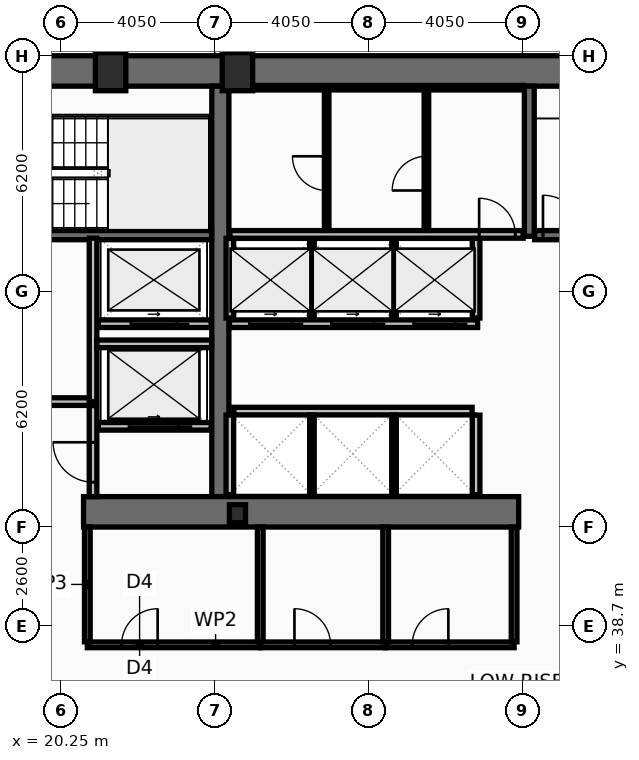
"""IFC4 building model, lengths in metres.
Left out: names, types, materials, properties, quantities, classifications, styles, units other than length and angle.
Written with IfcOpenShell. Run it as: python <this file> out.ifc"""

import sys

from ifc_helpers import new_model, si_unit, direction, frame, frame_2d, origin, origin_2d, place, context, subcontext, project, spatial, rectangle, hollow_rectangle, i_section, extrude, element, fill, save


model = new_model("IFC4")
c1 = context("Model", 3, precision=1e-05, world=origin(), true_north=direction((0.0, 1.0)))
c2 = subcontext(c1, "Body", "Model", "MODEL_VIEW")
j1 = project(units=[si_unit("LENGTHUNIT", "METRE"), si_unit("PLANEANGLEUNIT", "RADIAN")], contexts=[c1])
p1 = place(None, origin())
s1 = spatial("IfcSite", under=j1, at=p1, CompositionType="ELEMENT")
p2 = place(p1, origin())
s2 = spatial("IfcBuilding", under=s1, at=p2, CompositionType="ELEMENT")
p3 = place(p2, frame((0.0, 0.0, 57.8)))
s3 = spatial("IfcBuildingStorey", under=s2, at=p3, CompositionType="ELEMENT", Elevation=57.8)
p4 = place(p3, frame((16.2, 53.3, 0.0), z_axis=(0.0, 0.0, 1.0), x_axis=(1.0, 0.0, 0.0)))
e1 = element("IfcWall", 1, at=p4, inside=s3, PredefinedType="SHEAR", context=c2, shape_type="SweptSolid", body=[
    extrude(rectangle(XDim=40.5, YDim=0.8, at=frame_2d((20.25, 0.0))), origin(), (0.0, 0.0, 1.0), 3.82),
])
p5 = place(p3, frame((24.45, 42.1, 0.0), z_axis=(0.0, 0.0, 1.0), x_axis=(0.0, 1.0, 0.0)))
e2 = element("IfcWall", 2, at=p5, inside=s3, PredefinedType="SHEAR", context=c2, shape_type="SweptSolid", body=[
    extrude(rectangle(XDim=10.8, YDim=0.45, at=frame_2d((5.4, 0.0))), origin(), (0.0, 0.0, 1.0), 3.82),
])
p6 = place(p3, frame((32.3, 41.7, 0.0), z_axis=(0.0, 0.0, 1.0), x_axis=(-1.0, 0.0, 0.0)))
e3 = element("IfcWall", 3, at=p6, inside=s3, PredefinedType="SHEAR", context=c2, shape_type="SweptSolid", body=[
    extrude(rectangle(XDim=11.45, YDim=0.8, at=frame_2d((5.725, 0.0))), origin(), (0.0, 0.0, 1.0), 3.82),
])
p7 = place(p3, frame((32.58, 48.95, 0.0), z_axis=(0.0, 0.0, 1.0), x_axis=(0.0, 1.0, 0.0)))
e4 = element("IfcWall", 4, at=p7, inside=s3, PredefinedType="SHEAR", context=c2, shape_type="SweptSolid", body=[
    extrude(rectangle(XDim=3.95, YDim=0.26, at=frame_2d((1.975, 0.0))), origin(), (0.0, 0.0, 1.0), 3.82),
])
p8 = place(p3, frame((17.0, 48.98, 0.0), z_axis=(0.0, 0.0, 1.0), x_axis=(1.0, 0.0, 0.0)))
e5 = element("IfcWall", 5, at=p8, inside=s3, PredefinedType="SHEAR", context=c2, shape_type="SweptSolid", body=[
    extrude(rectangle(XDim=7.22, YDim=0.24, at=frame_2d((3.61, 0.0))), origin(), (0.0, 0.0, 1.0), 3.82),
])
p9 = place(p8, frame((0.22, 0.0, 0.0)))
e6 = element("IfcOpeningElement", 6, at=p9, cuts=e5, PredefinedType="OPENING", context=c2, shape_type="SweptSolid", body=[
    extrude(rectangle(XDim=1.05, YDim=2.15, at=frame_2d((0.525, 1.075))), frame((0.0, 0.13, 0.0), z_axis=(0.0, -1.0, 0.0), x_axis=(1.0, 0.0, 0.0)), (0.0, 0.0, 1.0), 0.26),
])
p10 = place(p3, frame((32.72, 48.98, 0.0), z_axis=(0.0, 0.0, 1.0), x_axis=(1.0, 0.0, 0.0)))
e7 = element("IfcWall", 7, at=p10, inside=s3, PredefinedType="SHEAR", context=c2, shape_type="SweptSolid", body=[
    extrude(rectangle(XDim=7.56, YDim=0.24, at=frame_2d((3.78, 0.0))), origin(), (0.0, 0.0, 1.0), 3.82),
])
p11 = place(p10, frame((0.22, 0.0, 0.0)))
e8 = element("IfcOpeningElement", 8, at=p11, cuts=e7, PredefinedType="OPENING", context=c2, shape_type="SweptSolid", body=[
    extrude(rectangle(XDim=1.05, YDim=2.15, at=frame_2d((0.525, 1.075))), frame((0.0, 0.13, 0.0), z_axis=(0.0, -1.0, 0.0), x_axis=(1.0, 0.0, 0.0)), (0.0, 0.0, 1.0), 0.26),
])
for number, where, z_axis, x_axis in (
    (9, (21.562, 53.28, 0.0), (0.0, 0.0, 1.0), (1.0, 0.0, 0.0)),
    (10, (24.9, 53.28, 0.0), (0.0, 0.0, 1.0), (1.0, 0.0, 0.0)),
):
    element("IfcColumn", number, at=place(p3, frame(where, z_axis=z_axis, x_axis=x_axis)), inside=s3, PredefinedType="COLUMN", context=c2, shape_type="SweptSolid", body=[
        extrude(hollow_rectangle(XDim=0.8, YDim=1.0, WallThickness=0.055, at=origin_2d()), origin(), (0.0, 0.0, 1.0), 4.0),
    ])
p12 = place(p3, frame((24.9, 41.65, 0.0), z_axis=(0.0, 0.0, 1.0), x_axis=(1.0, 0.0, 0.0)))
e11 = element("IfcColumn", 11, at=p12, inside=s3, PredefinedType="COLUMN", context=c2, shape_type="SweptSolid", body=[
    extrude(i_section(OverallWidth=0.424, OverallDepth=0.474, WebThickness=0.048, FlangeThickness=0.077, at=origin_2d()), origin(), (0.0, 0.0, 1.0), 4.0),
])
p13 = place(p3, frame((24.21, 43.95, 0.0), z_axis=(0.0, 0.0, 1.0), x_axis=(-1.0, 0.0, 0.0)))
e12 = element("IfcWall", 12, at=p13, inside=s3, PredefinedType="PARTITIONING", context=c2, shape_type="SweptSolid", body=[
    extrude(rectangle(XDim=2.97, YDim=0.2, at=frame_2d((1.485, 0.0))), origin(), (0.0, 0.0, 1.0), 3.82),
])
p14 = place(p13, frame((0.86, 0.0, 0.0)))
e13 = element("IfcOpeningElement", 13, at=p14, cuts=e12, PredefinedType="OPENING", context=c2, shape_type="SweptSolid", body=[
    extrude(rectangle(XDim=1.3, YDim=2.18, at=frame_2d((0.65, 1.09))), frame((0.0, 0.11, 0.0), z_axis=(0.0, -1.0, 0.0), x_axis=(1.0, 0.0, 0.0)), (0.0, 0.0, 1.0), 0.22),
])
p15 = place(p3, frame((24.21, 46.65, 0.0), z_axis=(0.0, 0.0, 1.0), x_axis=(-1.0, 0.0, 0.0)))
e14 = element("IfcWall", 14, at=p15, inside=s3, PredefinedType="PARTITIONING", context=c2, shape_type="SweptSolid", body=[
    extrude(rectangle(XDim=2.97, YDim=0.2, at=frame_2d((1.485, 0.0))), origin(), (0.0, 0.0, 1.0), 3.82),
])
p16 = place(p15, frame((0.91, 0.0, 0.0)))
e15 = element("IfcOpeningElement", 15, at=p16, cuts=e14, PredefinedType="OPENING", context=c2, shape_type="SweptSolid", body=[
    extrude(rectangle(XDim=1.2, YDim=2.18, at=frame_2d((0.6, 1.09))), frame((0.0, 0.11, 0.0), z_axis=(0.0, -1.0, 0.0), x_axis=(1.0, 0.0, 0.0)), (0.0, 0.0, 1.0), 0.22),
])
p17 = place(p3, frame((31.22, 46.65, 0.0), z_axis=(0.0, 0.0, 1.0), x_axis=(-1.0, 0.0, 0.0)))
e16 = element("IfcWall", 16, at=p17, inside=s3, PredefinedType="PARTITIONING", context=c2, shape_type="SweptSolid", body=[
    extrude(rectangle(XDim=6.53, YDim=0.2, at=frame_2d((3.265, 0.0))), origin(), (0.0, 0.0, 1.0), 3.82),
])
p18 = place(p17, frame((4.9, 0.0, 0.0)))
e17 = element("IfcOpeningElement", 17, at=p18, cuts=e16, PredefinedType="OPENING", context=c2, shape_type="SweptSolid", body=[
    extrude(rectangle(XDim=1.1, YDim=2.18, at=frame_2d((0.55, 1.09))), frame((0.0, 0.11, 0.0), z_axis=(0.0, -1.0, 0.0), x_axis=(1.0, 0.0, 0.0)), (0.0, 0.0, 1.0), 0.22),
])
p19 = place(p17, frame((2.74, 0.0, 0.0)))
e18 = element("IfcOpeningElement", 18, at=p19, cuts=e16, PredefinedType="OPENING", context=c2, shape_type="SweptSolid", body=[
    extrude(rectangle(XDim=1.1, YDim=2.18, at=frame_2d((0.55, 1.09))), frame((0.0, 0.11, 0.0), z_axis=(0.0, -1.0, 0.0), x_axis=(1.0, 0.0, 0.0)), (0.0, 0.0, 1.0), 0.22),
])
p20 = place(p17, frame((0.58, 0.0, 0.0)))
e19 = element("IfcOpeningElement", 19, at=p20, cuts=e16, PredefinedType="OPENING", context=c2, shape_type="SweptSolid", body=[
    extrude(rectangle(XDim=1.1, YDim=2.18, at=frame_2d((0.55, 1.09))), frame((0.0, 0.11, 0.0), z_axis=(0.0, -1.0, 0.0), x_axis=(1.0, 0.0, 0.0)), (0.0, 0.0, 1.0), 0.22),
])
p21 = place(p3, frame((21.1, 44.6, 0.0), z_axis=(0.0, 0.0, 1.0), x_axis=(0.0, 1.0, 0.0)))
e20 = element("IfcWall", 20, at=p21, inside=s3, PredefinedType="PARTITIONING", context=c2, shape_type="SweptSolid", body=[
    extrude(rectangle(XDim=4.3, YDim=0.2, at=frame_2d((2.15, 0.0))), origin(), (0.0, 0.0, 1.0), 3.82),
])
p22 = place(p3, frame((17.0, 44.6, 0.0), z_axis=(0.0, 0.0, 1.0), x_axis=(1.0, 0.0, 0.0)))
e21 = element("IfcWall", 21, at=p22, inside=s3, PredefinedType="PARTITIONING", context=c2, shape_type="SweptSolid", body=[
    extrude(rectangle(XDim=4.0, YDim=0.2, at=frame_2d((2.0, 0.0))), origin(), (0.0, 0.0, 1.0), 3.82),
])
p23 = place(p22, frame((1.25, 0.0, 0.0)))
e22 = element("IfcOpeningElement", 22, at=p23, cuts=e21, PredefinedType="OPENING", context=c2, shape_type="SweptSolid", body=[
    extrude(rectangle(XDim=1.05, YDim=2.15, at=frame_2d((0.525, 1.075))), frame((0.0, 0.11, 0.0), z_axis=(0.0, -1.0, 0.0), x_axis=(1.0, 0.0, 0.0)), (0.0, 0.0, 1.0), 0.22),
])
p24 = place(p3, frame((21.2, 46.12, 0.0), z_axis=(0.0, 0.0, 1.0), x_axis=(1.0, 0.0, 0.0)))
e23 = element("IfcWall", 23, at=p24, inside=s3, PredefinedType="PARTITIONING", context=c2, shape_type="SweptSolid", body=[
    extrude(rectangle(XDim=3.02, YDim=0.2, at=frame_2d((1.51, 0.0))), origin(), (0.0, 0.0, 1.0), 3.82),
])
p25 = place(p3, frame((21.1, 42.1, 0.0), z_axis=(0.0, 0.0, 1.0), x_axis=(0.0, 1.0, 0.0)))
e24 = element("IfcWall", 24, at=p25, inside=s3, PredefinedType="PARTITIONING", context=c2, shape_type="SweptSolid", body=[
    extrude(rectangle(XDim=2.395, YDim=0.2, at=frame_2d((1.198, 0.0))), origin(), (0.0, 0.0, 1.0), 3.82),
])
p26 = place(p25, frame((0.38, 0.0, 0.0)))
e25 = element("IfcOpeningElement", 25, at=p26, cuts=e24, PredefinedType="OPENING", context=c2, shape_type="SweptSolid", body=[
    extrude(rectangle(XDim=1.05, YDim=2.15, at=frame_2d((0.525, 1.075))), frame((0.0, 0.11, 0.0), z_axis=(0.0, -1.0, 0.0), x_axis=(1.0, 0.0, 0.0)), (0.0, 0.0, 1.0), 0.22),
])
for number, where, z_axis, x_axis in (
    (26, (24.7, 46.8, 0.0), (0.0, 0.0, 1.0), (0.0, 1.0, 0.0)),
    (27, (31.18, 46.8, 0.0), (0.0, 0.0, 1.0), (0.0, 1.0, 0.0)),
):
    element("IfcWall", number, at=place(p3, frame(where, z_axis=z_axis, x_axis=x_axis)), inside=s3, PredefinedType="PARTITIONING", context=c2, shape_type="SweptSolid", body=[
        extrude(rectangle(XDim=2.095, YDim=0.2, at=frame_2d((1.047, 0.0))), origin(), (0.0, 0.0, 1.0), 3.82),
    ])
for number, where, z_axis, x_axis in (
    (28, (26.86, 46.8, 0.0), (0.0, 0.0, 1.0), (0.0, 1.0, 0.0)),
    (29, (29.02, 46.8, 0.0), (0.0, 0.0, 1.0), (0.0, 1.0, 0.0)),
):
    element("IfcWall", number, at=place(p3, frame(where, z_axis=z_axis, x_axis=x_axis)), inside=s3, PredefinedType="PARTITIONING", context=c2, shape_type="SweptSolid", body=[
        extrude(rectangle(XDim=2.095, YDim=0.12, at=frame_2d((1.047, 0.0))), origin(), (0.0, 0.0, 1.0), 3.82),
    ])
p27 = place(p3, frame((24.805, 44.35, 0.0), z_axis=(0.0, 0.0, 1.0), x_axis=(1.0, 0.0, 0.0)))
e30 = element("IfcWall", 30, at=p27, inside=s3, PredefinedType="PARTITIONING", context=c2, shape_type="SweptSolid", body=[
    extrude(rectangle(XDim=6.27, YDim=0.2, at=frame_2d((3.135, 0.0))), origin(), (0.0, 0.0, 1.0), 3.82),
])
for number, where, z_axis, x_axis in (
    (31, (24.7, 42.15, 0.0), (0.0, 0.0, 1.0), (0.0, 1.0, 0.0)),
    (32, (31.18, 42.15, 0.0), (0.0, 0.0, 1.0), (0.0, 1.0, 0.0)),
):
    element("IfcWall", number, at=place(p3, frame(where, z_axis=z_axis, x_axis=x_axis)), inside=s3, PredefinedType="PARTITIONING", context=c2, shape_type="SweptSolid", body=[
        extrude(rectangle(XDim=2.095, YDim=0.2, at=frame_2d((1.048, 0.0))), origin(), (0.0, 0.0, 1.0), 3.82),
    ])
for number, where, z_axis, x_axis in (
    (33, (26.86, 42.15, 0.0), (0.0, 0.0, 1.0), (0.0, 1.0, 0.0)),
    (34, (29.02, 42.15, 0.0), (0.0, 0.0, 1.0), (0.0, 1.0, 0.0)),
):
    element("IfcWall", number, at=place(p3, frame(where, z_axis=z_axis, x_axis=x_axis)), inside=s3, PredefinedType="PARTITIONING", context=c2, shape_type="SweptSolid", body=[
        extrude(rectangle(XDim=2.095, YDim=0.12, at=frame_2d((1.048, 0.0))), origin(), (0.0, 0.0, 1.0), 3.82),
    ])
p28 = place(p3, frame((24.7, 52.86, 0.0), z_axis=(0.0, 0.0, 1.0), x_axis=(1.0, 0.0, 0.0)))
e35 = element("IfcWall", 35, at=p28, inside=s3, PredefinedType="PARTITIONING", context=c2, shape_type="SweptSolid", body=[
    extrude(rectangle(XDim=7.72, YDim=0.12, at=frame_2d((3.86, 0.0))), origin(), (0.0, 0.0, 1.0), 3.82),
])
p29 = place(p3, frame((24.7, 49.0, 0.0), z_axis=(0.0, 0.0, 1.0), x_axis=(1.0, 0.0, 0.0)))
e36 = element("IfcWall", 36, at=p29, inside=s3, PredefinedType="PARTITIONING", context=c2, shape_type="SweptSolid", body=[
    extrude(rectangle(XDim=7.72, YDim=0.2, at=frame_2d((3.86, 0.0))), origin(), (0.0, 0.0, 1.0), 3.82),
])
p30 = place(p29, frame((6.56, 0.0, 0.0)))
e37 = element("IfcOpeningElement", 37, at=p30, cuts=e36, PredefinedType="OPENING", context=c2, shape_type="SweptSolid", body=[
    extrude(rectangle(XDim=0.95, YDim=2.1, at=frame_2d((0.475, 1.05))), frame((0.0, 0.11, 0.0), z_axis=(0.0, -1.0, 0.0), x_axis=(1.0, 0.0, 0.0)), (0.0, 0.0, 1.0), 0.22),
])
p31 = place(p3, frame((27.248, 49.105, 0.0), z_axis=(0.0, 0.0, 1.0), x_axis=(0.0, 1.0, 0.0)))
e38 = element("IfcWall", 38, at=p31, inside=s3, PredefinedType="PARTITIONING", context=c2, shape_type="SweptSolid", body=[
    extrude(rectangle(XDim=3.69, YDim=0.12, at=frame_2d((1.845, 0.0))), origin(), (0.0, 0.0, 1.0), 3.82),
])
p32 = place(p31, frame((1.05, 0.0, 0.0)))
e39 = element("IfcOpeningElement", 39, at=p32, cuts=e38, PredefinedType="OPENING", context=c2, shape_type="SweptSolid", body=[
    extrude(rectangle(XDim=0.9, YDim=2.05, at=frame_2d((0.45, 1.025))), frame((0.0, 0.07, 0.0), z_axis=(0.0, -1.0, 0.0), x_axis=(1.0, 0.0, 0.0)), (0.0, 0.0, 1.0), 0.14),
])
p33 = place(p3, frame((29.872, 49.105, 0.0), z_axis=(0.0, 0.0, 1.0), x_axis=(0.0, 1.0, 0.0)))
e40 = element("IfcWall", 40, at=p33, inside=s3, PredefinedType="PARTITIONING", context=c2, shape_type="SweptSolid", body=[
    extrude(rectangle(XDim=3.69, YDim=0.12, at=frame_2d((1.845, 0.0))), origin(), (0.0, 0.0, 1.0), 3.82),
])
p34 = place(p33, frame((1.05, 0.0, 0.0)))
e41 = element("IfcOpeningElement", 41, at=p34, cuts=e40, PredefinedType="OPENING", context=c2, shape_type="SweptSolid", body=[
    extrude(rectangle(XDim=0.9, YDim=2.05, at=frame_2d((0.45, 1.025))), frame((0.0, 0.07, 0.0), z_axis=(0.0, -1.0, 0.0), x_axis=(1.0, 0.0, 0.0)), (0.0, 0.0, 1.0), 0.14),
])
p35 = place(p3, frame((20.95, 38.2, 0.0), z_axis=(0.0, 0.0, 1.0), x_axis=(1.0, 0.0, 0.0)))
e42 = element("IfcWall", 42, at=p35, inside=s3, PredefinedType="PARTITIONING", context=c2, shape_type="SweptSolid", body=[
    extrude(rectangle(XDim=4.55, YDim=0.15, at=frame_2d((2.275, 0.0))), origin(), (0.0, 0.0, 1.0), 3.01),
])
p36 = place(p35, frame((0.9, 0.0, 0.0)))
e43 = element("IfcOpeningElement", 43, at=p36, cuts=e42, PredefinedType="OPENING", context=c2, shape_type="SweptSolid", body=[
    extrude(rectangle(XDim=0.95, YDim=2.05, at=frame_2d((0.475, 1.025))), frame((0.0, 0.085, 0.0), z_axis=(0.0, -1.0, 0.0), x_axis=(1.0, 0.0, 0.0)), (0.0, 0.0, 1.0), 0.17),
])
p37 = place(p3, frame((25.5, 38.2, 0.0), z_axis=(0.0, 0.0, 1.0), x_axis=(1.0, 0.0, 0.0)))
e44 = element("IfcWall", 44, at=p37, inside=s3, PredefinedType="PARTITIONING", context=c2, shape_type="SweptSolid", body=[
    extrude(rectangle(XDim=3.3, YDim=0.15, at=frame_2d((1.65, 0.0))), origin(), (0.0, 0.0, 1.0), 3.82),
])
p38 = place(p37, frame((0.9, 0.0, 0.0)))
e45 = element("IfcOpeningElement", 45, at=p38, cuts=e44, PredefinedType="OPENING", context=c2, shape_type="SweptSolid", body=[
    extrude(rectangle(XDim=0.95, YDim=2.05, at=frame_2d((0.475, 1.025))), frame((0.0, 0.085, 0.0), z_axis=(0.0, -1.0, 0.0), x_axis=(1.0, 0.0, 0.0)), (0.0, 0.0, 1.0), 0.17),
])
p39 = place(p3, frame((28.8, 38.2, 0.0), z_axis=(0.0, 0.0, 1.0), x_axis=(1.0, 0.0, 0.0)))
e46 = element("IfcWall", 46, at=p39, inside=s3, PredefinedType="PARTITIONING", context=c2, shape_type="SweptSolid", body=[
    extrude(rectangle(XDim=3.38, YDim=0.15, at=frame_2d((1.69, 0.0))), origin(), (0.0, 0.0, 1.0), 3.01),
])
p40 = place(p39, frame((0.7, 0.0, 0.0)))
e47 = element("IfcOpeningElement", 47, at=p40, cuts=e46, PredefinedType="OPENING", context=c2, shape_type="SweptSolid", body=[
    extrude(rectangle(XDim=0.95, YDim=2.05, at=frame_2d((0.475, 1.025))), frame((0.0, 0.085, 0.0), z_axis=(0.0, -1.0, 0.0), x_axis=(1.0, 0.0, 0.0)), (0.0, 0.0, 1.0), 0.17),
])
for number, where, z_axis, x_axis in (
    (48, (20.95, 38.28, 0.0), (0.0, 0.0, 1.0), (0.0, 1.0, 0.0)),
    (49, (25.5, 38.28, 0.0), (0.0, 0.0, 1.0), (0.0, 1.0, 0.0)),
    (50, (28.8, 38.28, 0.0), (0.0, 0.0, 1.0), (0.0, 1.0, 0.0)),
    (51, (32.18, 38.28, 0.0), (0.0, 0.0, 1.0), (0.0, 1.0, 0.0)),
):
    element("IfcWall", number, at=place(p3, frame(where, z_axis=z_axis, x_axis=x_axis)), inside=s3, PredefinedType="PARTITIONING", context=c2, shape_type="SweptSolid", body=[
        extrude(rectangle(XDim=3.02, YDim=0.15, at=frame_2d((1.51, 0.0))), origin(), (0.0, 0.0, 1.0), 3.82),
    ])
p41 = place(p11, origin())
e52 = element("IfcDoor", 52, at=p41, inside=s3, OperationType="SINGLE_SWING_LEFT", PredefinedType="DOOR", context=c2, shape_type="SweptSolid", body=[
    extrude(rectangle(XDim=1.05, YDim=2.15, at=frame_2d((0.525, 1.075))), frame((0.0, 0.025, 0.0), z_axis=(0.0, -1.0, 0.0), x_axis=(1.0, 0.0, 0.0)), (0.0, 0.0, 1.0), 0.05),
])
fill(e8, e52)
p42 = place(p14, origin())
e53 = element("IfcDoor", 53, at=p42, inside=s3, OperationType="SLIDING_TO_LEFT", PredefinedType="DOOR", context=c2, shape_type="SweptSolid", body=[
    extrude(rectangle(XDim=1.3, YDim=2.18, at=frame_2d((0.65, 1.09))), frame((0.0, 0.025, 0.0), z_axis=(0.0, -1.0, 0.0), x_axis=(1.0, 0.0, 0.0)), (0.0, 0.0, 1.0), 0.05),
])
fill(e13, e53)
p43 = place(p16, origin())
e54 = element("IfcDoor", 54, at=p43, inside=s3, OperationType="SLIDING_TO_LEFT", PredefinedType="DOOR", context=c2, shape_type="SweptSolid", body=[
    extrude(rectangle(XDim=1.2, YDim=2.18, at=frame_2d((0.6, 1.09))), frame((0.0, 0.025, 0.0), z_axis=(0.0, -1.0, 0.0), x_axis=(1.0, 0.0, 0.0)), (0.0, 0.0, 1.0), 0.05),
])
fill(e15, e54)
p44 = place(p18, origin())
e55 = element("IfcDoor", 55, at=p44, inside=s3, OperationType="SLIDING_TO_LEFT", PredefinedType="DOOR", context=c2, shape_type="SweptSolid", body=[
    extrude(rectangle(XDim=1.1, YDim=2.18, at=frame_2d((0.55, 1.09))), frame((0.0, 0.025, 0.0), z_axis=(0.0, -1.0, 0.0), x_axis=(1.0, 0.0, 0.0)), (0.0, 0.0, 1.0), 0.05),
])
fill(e17, e55)
p45 = place(p19, origin())
e56 = element("IfcDoor", 56, at=p45, inside=s3, OperationType="SLIDING_TO_LEFT", PredefinedType="DOOR", context=c2, shape_type="SweptSolid", body=[
    extrude(rectangle(XDim=1.1, YDim=2.18, at=frame_2d((0.55, 1.09))), frame((0.0, 0.025, 0.0), z_axis=(0.0, -1.0, 0.0), x_axis=(1.0, 0.0, 0.0)), (0.0, 0.0, 1.0), 0.05),
])
fill(e18, e56)
p46 = place(p20, origin())
e57 = element("IfcDoor", 57, at=p46, inside=s3, OperationType="SLIDING_TO_LEFT", PredefinedType="DOOR", context=c2, shape_type="SweptSolid", body=[
    extrude(rectangle(XDim=1.1, YDim=2.18, at=frame_2d((0.55, 1.09))), frame((0.0, 0.025, 0.0), z_axis=(0.0, -1.0, 0.0), x_axis=(1.0, 0.0, 0.0)), (0.0, 0.0, 1.0), 0.05),
])
fill(e19, e57)
p47 = place(p26, origin())
e58 = element("IfcDoor", 58, at=p47, inside=s3, OperationType="SINGLE_SWING_RIGHT", PredefinedType="DOOR", context=c2, shape_type="SweptSolid", body=[
    extrude(rectangle(XDim=1.05, YDim=2.15, at=frame_2d((0.525, 1.075))), frame((0.0, 0.025, 0.0), z_axis=(0.0, -1.0, 0.0), x_axis=(1.0, 0.0, 0.0)), (0.0, 0.0, 1.0), 0.05),
])
fill(e25, e58)
p48 = place(p30, origin())
e59 = element("IfcDoor", 59, at=p48, inside=s3, OperationType="SINGLE_SWING_LEFT", PredefinedType="DOOR", context=c2, shape_type="SweptSolid", body=[
    extrude(rectangle(XDim=0.95, YDim=2.1, at=frame_2d((0.475, 1.05))), frame((0.0, 0.025, 0.0), z_axis=(0.0, -1.0, 0.0), x_axis=(1.0, 0.0, 0.0)), (0.0, 0.0, 1.0), 0.05),
])
fill(e37, e59)
p49 = place(p32, origin())
e60 = element("IfcDoor", 60, at=p49, inside=s3, OperationType="SINGLE_SWING_RIGHT", PredefinedType="DOOR", context=c2, shape_type="SweptSolid", body=[
    extrude(rectangle(XDim=0.9, YDim=2.05, at=frame_2d((0.45, 1.025))), frame((0.0, 0.025, 0.0), z_axis=(0.0, -1.0, 0.0), x_axis=(1.0, 0.0, 0.0)), (0.0, 0.0, 1.0), 0.05),
])
fill(e39, e60)
p50 = place(p34, origin())
e61 = element("IfcDoor", 61, at=p50, inside=s3, OperationType="SINGLE_SWING_LEFT", PredefinedType="DOOR", context=c2, shape_type="SweptSolid", body=[
    extrude(rectangle(XDim=0.9, YDim=2.05, at=frame_2d((0.45, 1.025))), frame((0.0, 0.025, 0.0), z_axis=(0.0, -1.0, 0.0), x_axis=(1.0, 0.0, 0.0)), (0.0, 0.0, 1.0), 0.05),
])
fill(e41, e61)
p51 = place(p36, origin())
e62 = element("IfcDoor", 62, at=p51, inside=s3, OperationType="SINGLE_SWING_RIGHT", PredefinedType="DOOR", context=c2, shape_type="SweptSolid", body=[
    extrude(rectangle(XDim=0.95, YDim=2.05, at=frame_2d((0.475, 1.025))), frame((0.0, 0.025, 0.0), z_axis=(0.0, -1.0, 0.0), x_axis=(1.0, 0.0, 0.0)), (0.0, 0.0, 1.0), 0.05),
])
fill(e43, e62)
p52 = place(p38, origin())
e63 = element("IfcDoor", 63, at=p52, inside=s3, OperationType="SINGLE_SWING_LEFT", PredefinedType="DOOR", context=c2, shape_type="SweptSolid", body=[
    extrude(rectangle(XDim=0.95, YDim=2.05, at=frame_2d((0.475, 1.025))), frame((0.0, 0.025, 0.0), z_axis=(0.0, -1.0, 0.0), x_axis=(1.0, 0.0, 0.0)), (0.0, 0.0, 1.0), 0.05),
])
fill(e45, e63)
p53 = place(p40, origin())
e64 = element("IfcDoor", 64, at=p53, inside=s3, OperationType="SINGLE_SWING_RIGHT", PredefinedType="DOOR", context=c2, shape_type="SweptSolid", body=[
    extrude(rectangle(XDim=0.95, YDim=2.05, at=frame_2d((0.475, 1.025))), frame((0.0, 0.025, 0.0), z_axis=(0.0, -1.0, 0.0), x_axis=(1.0, 0.0, 0.0)), (0.0, 0.0, 1.0), 0.05),
])
fill(e47, e64)
save(model, sys.argv[1])
